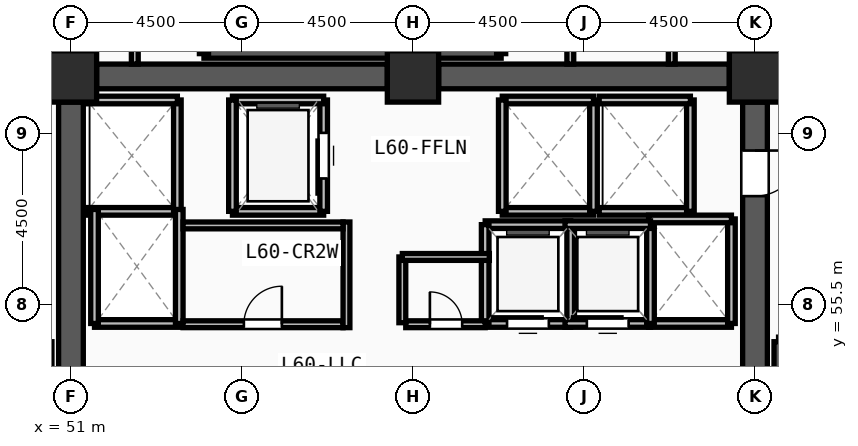
"""IFC4 building model, lengths in metres.
Left out: names, types, materials, properties, quantities, classifications, styles, units other than length and angle.
Written with IfcOpenShell. Run it as: python <this file> out.ifc"""

import sys

from ifc_helpers import new_model, si_unit, direction, frame, frame_2d, origin, origin_2d, place, context, subcontext, project, spatial, rectangle, extrude, source, transform, mapped, element, fill, save


model = new_model("IFC4")
c1 = context("Model", 3, precision=1e-05, world=origin(), true_north=direction((0.0, 1.0)))
c2 = subcontext(c1, "Body", "Model", "MODEL_VIEW")
j1 = project(units=[si_unit("LENGTHUNIT", "METRE"), si_unit("PLANEANGLEUNIT", "RADIAN")], contexts=[c1])
p1 = place(None, origin())
s1 = spatial("IfcSite", under=j1, at=p1, CompositionType="ELEMENT")
p2 = place(p1, origin())
s2 = spatial("IfcBuilding", under=s1, at=p2, CompositionType="ELEMENT")
p3 = place(p2, frame((0.0, 0.0, 231.75)))
s3 = spatial("IfcBuildingStorey", under=s2, at=p3, CompositionType="ELEMENT", Elevation=231.75)
m1 = source(origin(), c2, "Body", "SweptSolid", [
    extrude(rectangle(XDim=1.35, YDim=1.35, at=origin_2d()), origin(), (0.0, 0.0, 1.0), 4.5),
])
for number, where, z_axis, x_axis in (
    (1, (69.0, 61.5, 0.0), (0.0, 0.0, 1.0), (1.0, 0.0, 0.0)),
    (2, (60.0, 61.5, 0.0), (0.0, 0.0, 1.0), (1.0, 0.0, 0.0)),
    (3, (51.0, 61.5, 0.0), (0.0, 0.0, 1.0), (1.0, 0.0, 0.0)),
):
    element("IfcColumn", number, at=place(p3, frame(where, z_axis=z_axis, x_axis=x_axis)), inside=s3, PredefinedType="COLUMN", context=c2, shape_type="MappedRepresentation", body=[
        mapped(m1, transform((0.0, 0.0, 0.0), x_axis=(1.0, 0.0, 0.0), y_axis=(0.0, 1.0, 0.0), z_axis=(0.0, 0.0, 1.0), scale=1.0)),
    ])
for number, where, z_axis, x_axis in (
    (4, (51.675, 61.5, 0.0), (0.0, 0.0, 1.0), (1.0, 0.0, 0.0)),
    (5, (60.675, 61.5, 0.0), (0.0, 0.0, 1.0), (1.0, 0.0, 0.0)),
):
    element("IfcWall", number, at=place(p3, frame(where, z_axis=z_axis, x_axis=x_axis)), inside=s3, PredefinedType="SHEAR", context=c2, shape_type="SweptSolid", body=[
        extrude(rectangle(XDim=7.65, YDim=0.65, at=frame_2d((3.825, 0.0))), origin(), (0.0, 0.0, 1.0), 4.32),
    ])
p4 = place(p3, frame((69.0, 60.825, 0.0), z_axis=(0.0, 0.0, 1.0), x_axis=(0.0, -1.0, 0.0)))
e6 = element("IfcWall", 6, at=p4, inside=s3, PredefinedType="SHEAR", context=c2, shape_type="SweptSolid", body=[
    extrude(rectangle(XDim=13.65, YDim=0.65, at=frame_2d((6.825, 0.0))), origin(), (0.0, 0.0, 1.0), 4.32),
])
m2 = source(origin(), c2, "Body", "SweptSolid", [
    extrude(rectangle(XDim=1.2, YDim=2.2, at=frame_2d((0.6, 1.1))), frame((0.0, 0.335, 0.0), z_axis=(0.0, -1.0, 0.0), x_axis=(1.0, 0.0, 0.0)), (0.0, 0.0, 1.0), 0.67),
])
p5 = place(p4, frame((1.275, 0.0, 0.0)))
e7 = element("IfcOpeningElement", 7, at=p5, cuts=e6, PredefinedType="OPENING", context=c2, shape_type="MappedRepresentation", body=[
    mapped(m2, transform((0.0, 0.0, 0.0), x_axis=(1.0, 0.0, 0.0), y_axis=(0.0, 1.0, 0.0), z_axis=(0.0, 0.0, 1.0), scale=1.0)),
])
p6 = place(p3, frame((51.0, 47.175, 0.0), z_axis=(0.0, 0.0, 1.0), x_axis=(0.0, 1.0, 0.0)))
e8 = element("IfcWall", 8, at=p6, inside=s3, PredefinedType="SHEAR", context=c2, shape_type="SweptSolid", body=[
    extrude(rectangle(XDim=13.65, YDim=0.65, at=frame_2d((6.825, 0.0))), origin(), (0.0, 0.0, 1.0), 4.32),
])
for number, where, z_axis, x_axis in (
    (9, (69.62, 54.52, 0.0), (0.0, 0.0, 1.0), (0.0, -1.0, 0.0)),
    (10, (54.5, 62.1, 0.0), (0.0, 0.0, 1.0), (1.0, 0.0, 0.0)),
):
    element("IfcWall", number, at=place(p3, frame(where, z_axis=z_axis, x_axis=x_axis)), inside=s3, PredefinedType="SOLIDWALL", context=c2, shape_type="SweptSolid", body=[
        extrude(rectangle(XDim=7.82, YDim=0.24, at=frame_2d((3.91, 0.0))), origin(), (0.0, 0.0, 1.0), 4.32),
    ])
for number, where, z_axis, x_axis in (
    (11, (62.32, 62.1, 0.0), (0.0, 0.0, 1.0), (0.0, 1.0, 0.0)),
    (12, (54.5, 65.54, 0.0), (0.0, 0.0, 1.0), (0.0, -1.0, 0.0)),
):
    element("IfcWall", number, at=place(p3, frame(where, z_axis=z_axis, x_axis=x_axis)), inside=s3, PredefinedType="SOLIDWALL", context=c2, shape_type="SweptSolid", body=[
        extrude(rectangle(XDim=3.44, YDim=0.24, at=frame_2d((1.72, 0.0))), origin(), (0.0, 0.0, 1.0), 4.32),
    ])
p7 = place(p3, frame((55.25, 57.95, 0.0), z_axis=(0.0, 0.0, 1.0), x_axis=(1.0, 0.0, 0.0)))
e13 = element("IfcWall", 13, at=p7, inside=s3, PredefinedType="SOLIDWALL", context=c2, shape_type="SweptSolid", body=[
    extrude(rectangle(XDim=2.4, YDim=0.2, at=frame_2d((1.2, 0.0))), origin(), (0.0, 0.0, 1.0), 4.32),
])
p8 = place(p3, frame((57.65, 57.95, 0.0), z_axis=(0.0, 0.0, 1.0), x_axis=(0.0, 1.0, 0.0)))
e14 = element("IfcWall", 14, at=p8, inside=s3, PredefinedType="SOLIDWALL", context=c2, shape_type="SweptSolid", body=[
    extrude(rectangle(XDim=2.93, YDim=0.2, at=frame_2d((1.465, 0.0))), origin(), (0.0, 0.0, 1.0), 4.32),
])
m3 = source(origin(), c2, "Body", "SweptSolid", [
    extrude(rectangle(XDim=1.2, YDim=2.3, at=frame_2d((0.6, 1.15))), frame((0.0, 0.11, 0.0), z_axis=(0.0, -1.0, 0.0), x_axis=(1.0, 0.0, 0.0)), (0.0, 0.0, 1.0), 0.22),
])
p9 = place(p8, frame((0.865, 0.0, 0.0)))
e15 = element("IfcOpeningElement", 15, at=p9, cuts=e14, PredefinedType="OPENING", context=c2, shape_type="MappedRepresentation", body=[
    mapped(m3, transform((0.0, 0.0, 0.0), x_axis=(1.0, 0.0, 0.0), y_axis=(0.0, 1.0, 0.0), z_axis=(0.0, 0.0, 1.0), scale=1.0)),
])
p10 = place(p3, frame((57.65, 60.88, 0.0), z_axis=(0.0, 0.0, 1.0), x_axis=(-1.0, 0.0, 0.0)))
e16 = element("IfcWall", 16, at=p10, inside=s3, PredefinedType="SOLIDWALL", context=c2, shape_type="SweptSolid", body=[
    extrude(rectangle(XDim=2.4, YDim=0.2, at=frame_2d((1.2, 0.0))), origin(), (0.0, 0.0, 1.0), 4.32),
])
p11 = place(p3, frame((55.25, 60.88, 0.0), z_axis=(0.0, 0.0, 1.0), x_axis=(0.0, -1.0, 0.0)))
e17 = element("IfcWall", 17, at=p11, inside=s3, PredefinedType="SOLIDWALL", context=c2, shape_type="SweptSolid", body=[
    extrude(rectangle(XDim=2.93, YDim=0.2, at=frame_2d((1.465, 0.0))), origin(), (0.0, 0.0, 1.0), 4.32),
])
p12 = place(p3, frame((62.35, 57.95, 0.0), z_axis=(0.0, 0.0, 1.0), x_axis=(1.0, 0.0, 0.0)))
e18 = element("IfcWall", 18, at=p12, inside=s3, PredefinedType="SOLIDWALL", context=c2, shape_type="SweptSolid", body=[
    extrude(rectangle(XDim=2.4, YDim=0.2, at=frame_2d((1.2, 0.0))), origin(), (0.0, 0.0, 1.0), 4.32),
])
p13 = place(p3, frame((64.75, 57.95, 0.0), z_axis=(0.0, 0.0, 1.0), x_axis=(0.0, 1.0, 0.0)))
e19 = element("IfcWall", 19, at=p13, inside=s3, PredefinedType="SOLIDWALL", context=c2, shape_type="SweptSolid", body=[
    extrude(rectangle(XDim=2.93, YDim=0.2, at=frame_2d((1.465, 0.0))), origin(), (0.0, 0.0, 1.0), 4.32),
])
p14 = place(p3, frame((64.75, 60.88, 0.0), z_axis=(0.0, 0.0, 1.0), x_axis=(-1.0, 0.0, 0.0)))
e20 = element("IfcWall", 20, at=p14, inside=s3, PredefinedType="SOLIDWALL", context=c2, shape_type="SweptSolid", body=[
    extrude(rectangle(XDim=2.4, YDim=0.2, at=frame_2d((1.2, 0.0))), origin(), (0.0, 0.0, 1.0), 4.32),
])
p15 = place(p3, frame((62.35, 60.88, 0.0), z_axis=(0.0, 0.0, 1.0), x_axis=(0.0, -1.0, 0.0)))
e21 = element("IfcWall", 21, at=p15, inside=s3, PredefinedType="SOLIDWALL", context=c2, shape_type="SweptSolid", body=[
    extrude(rectangle(XDim=2.93, YDim=0.2, at=frame_2d((1.465, 0.0))), origin(), (0.0, 0.0, 1.0), 4.32),
])
p16 = place(p3, frame((64.9, 57.95, 0.0), z_axis=(0.0, 0.0, 1.0), x_axis=(1.0, 0.0, 0.0)))
e22 = element("IfcWall", 22, at=p16, inside=s3, PredefinedType="SOLIDWALL", context=c2, shape_type="SweptSolid", body=[
    extrude(rectangle(XDim=2.4, YDim=0.2, at=frame_2d((1.2, 0.0))), origin(), (0.0, 0.0, 1.0), 4.32),
])
p17 = place(p3, frame((67.3, 57.95, 0.0), z_axis=(0.0, 0.0, 1.0), x_axis=(0.0, 1.0, 0.0)))
e23 = element("IfcWall", 23, at=p17, inside=s3, PredefinedType="SOLIDWALL", context=c2, shape_type="SweptSolid", body=[
    extrude(rectangle(XDim=2.93, YDim=0.2, at=frame_2d((1.465, 0.0))), origin(), (0.0, 0.0, 1.0), 4.32),
])
for number, where, z_axis, x_axis in (
    (24, (67.3, 60.88, 0.0), (0.0, 0.0, 1.0), (-1.0, 0.0, 0.0)),
    (25, (51.4, 57.95, 0.0), (0.0, 0.0, 1.0), (1.0, 0.0, 0.0)),
):
    element("IfcWall", number, at=place(p3, frame(where, z_axis=z_axis, x_axis=x_axis)), inside=s3, PredefinedType="SOLIDWALL", context=c2, shape_type="SweptSolid", body=[
        extrude(rectangle(XDim=2.4, YDim=0.2, at=frame_2d((1.2, 0.0))), origin(), (0.0, 0.0, 1.0), 4.32),
    ])
p18 = place(p3, frame((53.8, 57.95, 0.0), z_axis=(0.0, 0.0, 1.0), x_axis=(0.0, 1.0, 0.0)))
e26 = element("IfcWall", 26, at=p18, inside=s3, PredefinedType="SOLIDWALL", context=c2, shape_type="SweptSolid", body=[
    extrude(rectangle(XDim=2.93, YDim=0.2, at=frame_2d((1.465, 0.0))), origin(), (0.0, 0.0, 1.0), 4.32),
])
p19 = place(p3, frame((53.8, 60.88, 0.0), z_axis=(0.0, 0.0, 1.0), x_axis=(-1.0, 0.0, 0.0)))
e27 = element("IfcWall", 27, at=p19, inside=s3, PredefinedType="SOLIDWALL", context=c2, shape_type="SweptSolid", body=[
    extrude(rectangle(XDim=2.4, YDim=0.2, at=frame_2d((1.2, 0.0))), origin(), (0.0, 0.0, 1.0), 4.32),
])
p20 = place(p3, frame((51.62, 55.0, 0.0), z_axis=(0.0, 0.0, 1.0), x_axis=(1.0, 0.0, 0.0)))
e28 = element("IfcWall", 28, at=p20, inside=s3, PredefinedType="SOLIDWALL", context=c2, shape_type="SweptSolid", body=[
    extrude(rectangle(XDim=2.23, YDim=0.2, at=frame_2d((1.115, 0.0))), origin(), (0.0, 0.0, 1.0), 4.32),
])
for number, where, z_axis, x_axis in (
    (29, (53.85, 55.0, 0.0), (0.0, 0.0, 1.0), (0.0, 1.0, 0.0)),
    (30, (51.62, 58.0, 0.0), (0.0, 0.0, 1.0), (0.0, -1.0, 0.0)),
):
    element("IfcWall", number, at=place(p3, frame(where, z_axis=z_axis, x_axis=x_axis)), inside=s3, PredefinedType="SOLIDWALL", context=c2, shape_type="SweptSolid", body=[
        extrude(rectangle(XDim=3.0, YDim=0.2, at=frame_2d((1.5, 0.0))), origin(), (0.0, 0.0, 1.0), 4.32),
    ])
p21 = place(p3, frame((66.2, 55.0, 0.0), z_axis=(0.0, 0.0, 1.0), x_axis=(1.0, 0.0, 0.0)))
e31 = element("IfcWall", 31, at=p21, inside=s3, PredefinedType="SOLIDWALL", context=c2, shape_type="SweptSolid", body=[
    extrude(rectangle(XDim=2.18, YDim=0.2, at=frame_2d((1.09, 0.0))), origin(), (0.0, 0.0, 1.0), 4.32),
])
p22 = place(p3, frame((68.38, 55.0, 0.0), z_axis=(0.0, 0.0, 1.0), x_axis=(0.0, 1.0, 0.0)))
e32 = element("IfcWall", 32, at=p22, inside=s3, PredefinedType="SOLIDWALL", context=c2, shape_type="SweptSolid", body=[
    extrude(rectangle(XDim=2.75, YDim=0.2, at=frame_2d((1.375, 0.0))), origin(), (0.0, 0.0, 1.0), 4.32),
])
p23 = place(p3, frame((68.38, 57.75, 0.0), z_axis=(0.0, 0.0, 1.0), x_axis=(-1.0, 0.0, 0.0)))
e33 = element("IfcWall", 33, at=p23, inside=s3, PredefinedType="SOLIDWALL", context=c2, shape_type="SweptSolid", body=[
    extrude(rectangle(XDim=2.18, YDim=0.2, at=frame_2d((1.09, 0.0))), origin(), (0.0, 0.0, 1.0), 4.32),
])
p24 = place(p3, frame((61.9, 55.0, 0.0), z_axis=(0.0, 0.0, 1.0), x_axis=(1.0, 0.0, 0.0)))
e34 = element("IfcWall", 34, at=p24, inside=s3, PredefinedType="SOLIDWALL", context=c2, shape_type="SweptSolid", body=[
    extrude(rectangle(XDim=2.25, YDim=0.2, at=frame_2d((1.125, 0.0))), origin(), (0.0, 0.0, 1.0), 4.32),
])
m4 = source(origin(), c2, "Body", "SweptSolid", [
    extrude(rectangle(XDim=1.1, YDim=2.2, at=frame_2d((0.55, 1.1))), frame((0.0, 0.11, 0.0), z_axis=(0.0, -1.0, 0.0), x_axis=(1.0, 0.0, 0.0)), (0.0, 0.0, 1.0), 0.22),
])
p25 = place(p24, frame((0.575, 0.0, 0.0)))
e35 = element("IfcOpeningElement", 35, at=p25, cuts=e34, PredefinedType="OPENING", context=c2, shape_type="MappedRepresentation", body=[
    mapped(m4, transform((0.0, 0.0, 0.0), x_axis=(1.0, 0.0, 0.0), y_axis=(0.0, 1.0, 0.0), z_axis=(0.0, 0.0, 1.0), scale=1.0)),
])
p26 = place(p3, frame((64.15, 55.0, 0.0), z_axis=(0.0, 0.0, 1.0), x_axis=(0.0, 1.0, 0.0)))
e36 = element("IfcWall", 36, at=p26, inside=s3, PredefinedType="SOLIDWALL", context=c2, shape_type="SweptSolid", body=[
    extrude(rectangle(XDim=2.6, YDim=0.2, at=frame_2d((1.3, 0.0))), origin(), (0.0, 0.0, 1.0), 4.32),
])
p27 = place(p3, frame((64.15, 57.6, 0.0), z_axis=(0.0, 0.0, 1.0), x_axis=(-1.0, 0.0, 0.0)))
e37 = element("IfcWall", 37, at=p27, inside=s3, PredefinedType="SOLIDWALL", context=c2, shape_type="SweptSolid", body=[
    extrude(rectangle(XDim=2.25, YDim=0.2, at=frame_2d((1.125, 0.0))), origin(), (0.0, 0.0, 1.0), 4.32),
])
p28 = place(p3, frame((61.9, 57.6, 0.0), z_axis=(0.0, 0.0, 1.0), x_axis=(0.0, -1.0, 0.0)))
e38 = element("IfcWall", 38, at=p28, inside=s3, PredefinedType="SOLIDWALL", context=c2, shape_type="SweptSolid", body=[
    extrude(rectangle(XDim=2.6, YDim=0.2, at=frame_2d((1.3, 0.0))), origin(), (0.0, 0.0, 1.0), 4.32),
])
p29 = place(p3, frame((64.0, 55.0, 0.0), z_axis=(0.0, 0.0, 1.0), x_axis=(1.0, 0.0, 0.0)))
e39 = element("IfcWall", 39, at=p29, inside=s3, PredefinedType="SOLIDWALL", context=c2, shape_type="SweptSolid", body=[
    extrude(rectangle(XDim=2.25, YDim=0.2, at=frame_2d((1.125, 0.0))), origin(), (0.0, 0.0, 1.0), 4.32),
])
p30 = place(p29, frame((0.575, 0.0, 0.0)))
e40 = element("IfcOpeningElement", 40, at=p30, cuts=e39, PredefinedType="OPENING", context=c2, shape_type="MappedRepresentation", body=[
    mapped(m4, transform((0.0, 0.0, 0.0), x_axis=(1.0, 0.0, 0.0), y_axis=(0.0, 1.0, 0.0), z_axis=(0.0, 0.0, 1.0), scale=1.0)),
])
p31 = place(p3, frame((66.25, 55.0, 0.0), z_axis=(0.0, 0.0, 1.0), x_axis=(0.0, 1.0, 0.0)))
e41 = element("IfcWall", 41, at=p31, inside=s3, PredefinedType="SOLIDWALL", context=c2, shape_type="SweptSolid", body=[
    extrude(rectangle(XDim=2.6, YDim=0.2, at=frame_2d((1.3, 0.0))), origin(), (0.0, 0.0, 1.0), 4.32),
])
p32 = place(p3, frame((66.25, 57.6, 0.0), z_axis=(0.0, 0.0, 1.0), x_axis=(-1.0, 0.0, 0.0)))
e42 = element("IfcWall", 42, at=p32, inside=s3, PredefinedType="SOLIDWALL", context=c2, shape_type="SweptSolid", body=[
    extrude(rectangle(XDim=2.25, YDim=0.2, at=frame_2d((1.125, 0.0))), origin(), (0.0, 0.0, 1.0), 4.32),
])
p33 = place(p3, frame((53.95, 54.98, 0.0), z_axis=(0.0, 0.0, 1.0), x_axis=(1.0, 0.0, 0.0)))
e43 = element("IfcWall", 43, at=p33, inside=s3, PredefinedType="PARTITIONING", context=c2, shape_type="SweptSolid", body=[
    extrude(rectangle(XDim=4.21, YDim=0.18, at=frame_2d((2.105, 0.0))), origin(), (0.0, 0.0, 1.0), 4.32),
])
m5 = source(origin(), c2, "Body", "SweptSolid", [
    extrude(rectangle(XDim=1.0, YDim=2.2, at=frame_2d((0.5, 1.1))), frame((0.0, 0.1, 0.0), z_axis=(0.0, -1.0, 0.0), x_axis=(1.0, 0.0, 0.0)), (0.0, 0.0, 1.0), 0.2),
])
p34 = place(p33, frame((1.6, 0.0, 0.0)))
e44 = element("IfcOpeningElement", 44, at=p34, cuts=e43, PredefinedType="OPENING", context=c2, shape_type="MappedRepresentation", body=[
    mapped(m5, transform((0.0, 0.0, 0.0), x_axis=(1.0, 0.0, 0.0), y_axis=(0.0, 1.0, 0.0), z_axis=(0.0, 0.0, 1.0), scale=1.0)),
])
p35 = place(p3, frame((59.81, 54.98, 0.0), z_axis=(0.0, 0.0, 1.0), x_axis=(1.0, 0.0, 0.0)))
e45 = element("IfcWall", 45, at=p35, inside=s3, PredefinedType="PARTITIONING", context=c2, shape_type="SweptSolid", body=[
    extrude(rectangle(XDim=2.09, YDim=0.18, at=frame_2d((1.045, 0.0))), origin(), (0.0, 0.0, 1.0), 4.32),
])
m6 = source(origin(), c2, "Body", "SweptSolid", [
    extrude(rectangle(XDim=0.85, YDim=2.1, at=frame_2d((0.425, 1.05))), frame((0.0, 0.1, 0.0), z_axis=(0.0, -1.0, 0.0), x_axis=(1.0, 0.0, 0.0)), (0.0, 0.0, 1.0), 0.2),
])
p36 = place(p35, frame((0.635, 0.0, 0.0)))
e46 = element("IfcOpeningElement", 46, at=p36, cuts=e45, PredefinedType="OPENING", context=c2, shape_type="MappedRepresentation", body=[
    mapped(m6, transform((0.0, 0.0, 0.0), x_axis=(1.0, 0.0, 0.0), y_axis=(0.0, 1.0, 0.0), z_axis=(0.0, 0.0, 1.0), scale=1.0)),
])
p37 = place(p3, frame((59.72, 55.02, 0.0), z_axis=(0.0, 0.0, 1.0), x_axis=(0.0, 1.0, 0.0)))
e47 = element("IfcWall", 47, at=p37, inside=s3, PredefinedType="PARTITIONING", context=c2, shape_type="SweptSolid", body=[
    extrude(rectangle(XDim=1.73, YDim=0.18, at=frame_2d((0.865, 0.0))), origin(), (0.0, 0.0, 1.0), 4.32),
])
p38 = place(p3, frame((59.72, 56.75, 0.0), z_axis=(0.0, 0.0, 1.0), x_axis=(1.0, 0.0, 0.0)))
e48 = element("IfcWall", 48, at=p38, inside=s3, PredefinedType="PARTITIONING", context=c2, shape_type="SweptSolid", body=[
    extrude(rectangle(XDim=2.29, YDim=0.18, at=frame_2d((1.145, 0.0))), origin(), (0.0, 0.0, 1.0), 4.32),
])
p39 = place(p3, frame((50.54, 61.95, 0.0), z_axis=(0.0, 0.0, 1.0), x_axis=(0.0, 1.0, 0.0)))
e49 = element("IfcWall", 49, at=p39, inside=s3, PredefinedType="PARTITIONING", context=c2, shape_type="SweptSolid", body=[
    extrude(rectangle(XDim=3.63, YDim=0.18, at=frame_2d((1.815, 0.0))), origin(), (0.0, 0.0, 1.0), 4.32),
])
for number, where, z_axis, x_axis in (
    (50, (52.68, 61.825, 0.0), (0.0, 0.0, 1.0), (0.0, 1.0, 0.0)),
    (51, (64.14, 61.825, 0.0), (0.0, 0.0, 1.0), (0.0, 1.0, 0.0)),
    (52, (66.81, 61.825, 0.0), (0.0, 0.0, 1.0), (0.0, 1.0, 0.0)),
):
    element("IfcWall", number, at=place(p3, frame(where, z_axis=z_axis, x_axis=x_axis)), inside=s3, PredefinedType="PARTITIONING", context=c2, shape_type="SweptSolid", body=[
        extrude(rectangle(XDim=3.755, YDim=0.18, at=frame_2d((1.877, 0.0))), origin(), (0.0, 0.0, 1.0), 4.32),
    ])
p40 = place(p3, frame((58.25, 54.89, 0.0), z_axis=(0.0, 0.0, 1.0), x_axis=(0.0, 1.0, 0.0)))
e53 = element("IfcWall", 53, at=p40, inside=s3, PredefinedType="PARTITIONING", context=c2, shape_type="SweptSolid", body=[
    extrude(rectangle(XDim=2.78, YDim=0.18, at=frame_2d((1.39, 0.0))), origin(), (0.0, 0.0, 1.0), 4.32),
])
p41 = place(p3, frame((53.95, 57.58, 0.0), z_axis=(0.0, 0.0, 1.0), x_axis=(1.0, 0.0, 0.0)))
e54 = element("IfcWall", 54, at=p41, inside=s3, PredefinedType="PARTITIONING", context=c2, shape_type="SweptSolid", body=[
    extrude(rectangle(XDim=4.21, YDim=0.18, at=frame_2d((2.105, 0.0))), origin(), (0.0, 0.0, 1.0), 4.32),
])
m7 = source(origin(), c2, "Body", "SweptSolid", [
    extrude(rectangle(XDim=1.2, YDim=2.2, at=frame_2d((0.6, 1.1))), frame((0.0, 0.025, 0.0), z_axis=(0.0, -1.0, 0.0), x_axis=(1.0, 0.0, 0.0)), (0.0, 0.0, 1.0), 0.05),
])
p42 = place(p5, origin())
e55 = element("IfcDoor", 55, at=p42, inside=s3, OperationType="SINGLE_SWING_LEFT", PredefinedType="DOOR", context=c2, shape_type="MappedRepresentation", body=[
    mapped(m7, transform((0.0, 0.0, 0.0), x_axis=(1.0, 0.0, 0.0), y_axis=(0.0, 1.0, 0.0), z_axis=(0.0, 0.0, 1.0), scale=1.0)),
])
fill(e7, e55)
m8 = source(origin(), c2, "Body", "SweptSolid", [
    extrude(rectangle(XDim=1.2, YDim=2.3, at=frame_2d((0.6, 1.15))), frame((0.0, 0.025, 0.0), z_axis=(0.0, -1.0, 0.0), x_axis=(1.0, 0.0, 0.0)), (0.0, 0.0, 1.0), 0.05),
])
p43 = place(p9, origin())
e56 = element("IfcDoor", 56, at=p43, inside=s3, OperationType="SLIDING_TO_LEFT", PredefinedType="DOOR", context=c2, shape_type="MappedRepresentation", body=[
    mapped(m8, transform((0.0, 0.0, 0.0), x_axis=(1.0, 0.0, 0.0), y_axis=(0.0, 1.0, 0.0), z_axis=(0.0, 0.0, 1.0), scale=1.0)),
])
fill(e15, e56)
m9 = source(origin(), c2, "Body", "SweptSolid", [
    extrude(rectangle(XDim=1.1, YDim=2.2, at=frame_2d((0.55, 1.1))), frame((0.0, 0.025, 0.0), z_axis=(0.0, -1.0, 0.0), x_axis=(1.0, 0.0, 0.0)), (0.0, 0.0, 1.0), 0.05),
])
p44 = place(p25, origin())
e57 = element("IfcDoor", 57, at=p44, inside=s3, OperationType="SLIDING_TO_LEFT", PredefinedType="DOOR", context=c2, shape_type="MappedRepresentation", body=[
    mapped(m9, transform((0.0, 0.0, 0.0), x_axis=(1.0, 0.0, 0.0), y_axis=(0.0, 1.0, 0.0), z_axis=(0.0, 0.0, 1.0), scale=1.0)),
])
fill(e35, e57)
p45 = place(p30, origin())
e58 = element("IfcDoor", 58, at=p45, inside=s3, OperationType="SLIDING_TO_LEFT", PredefinedType="DOOR", context=c2, shape_type="MappedRepresentation", body=[
    mapped(m9, transform((0.0, 0.0, 0.0), x_axis=(1.0, 0.0, 0.0), y_axis=(0.0, 1.0, 0.0), z_axis=(0.0, 0.0, 1.0), scale=1.0)),
])
fill(e40, e58)
m10 = source(origin(), c2, "Body", "SweptSolid", [
    extrude(rectangle(XDim=1.0, YDim=2.2, at=frame_2d((0.5, 1.1))), frame((0.0, 0.025, 0.0), z_axis=(0.0, -1.0, 0.0), x_axis=(1.0, 0.0, 0.0)), (0.0, 0.0, 1.0), 0.05),
])
p46 = place(p34, origin())
e59 = element("IfcDoor", 59, at=p46, inside=s3, OperationType="SINGLE_SWING_RIGHT", PredefinedType="DOOR", context=c2, shape_type="MappedRepresentation", body=[
    mapped(m10, transform((0.0, 0.0, 0.0), x_axis=(1.0, 0.0, 0.0), y_axis=(0.0, 1.0, 0.0), z_axis=(0.0, 0.0, 1.0), scale=1.0)),
])
fill(e44, e59)
m11 = source(origin(), c2, "Body", "SweptSolid", [
    extrude(rectangle(XDim=0.85, YDim=2.1, at=frame_2d((0.425, 1.05))), frame((0.0, 0.025, 0.0), z_axis=(0.0, -1.0, 0.0), x_axis=(1.0, 0.0, 0.0)), (0.0, 0.0, 1.0), 0.05),
])
p47 = place(p36, origin())
e60 = element("IfcDoor", 60, at=p47, inside=s3, OperationType="SINGLE_SWING_LEFT", PredefinedType="DOOR", context=c2, shape_type="MappedRepresentation", body=[
    mapped(m11, transform((0.0, 0.0, 0.0), x_axis=(1.0, 0.0, 0.0), y_axis=(0.0, 1.0, 0.0), z_axis=(0.0, 0.0, 1.0), scale=1.0)),
])
fill(e46, e60)
save(model, sys.argv[1])
